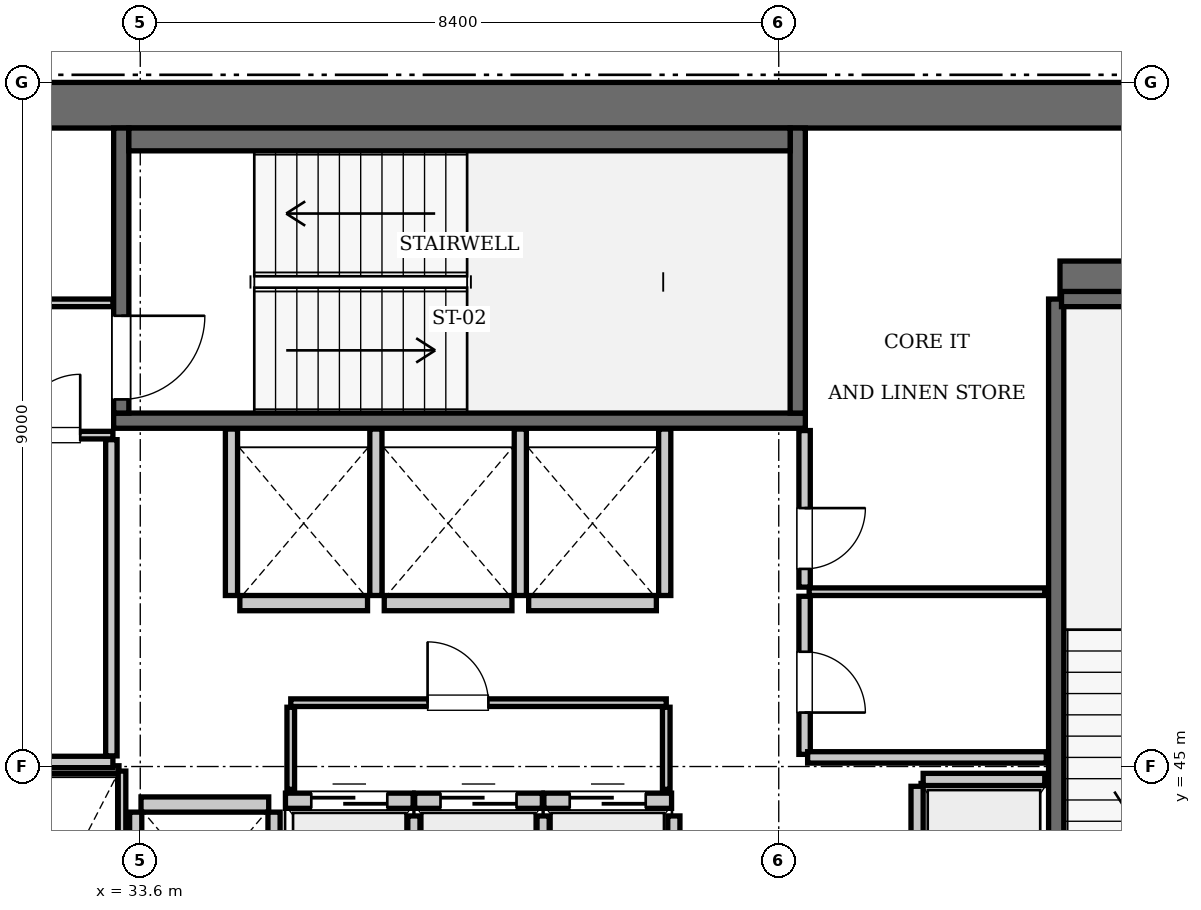
"""IFC4 building model, lengths in metres.
Left out: names, types, materials, properties, quantities, classifications, styles, units other than length and angle.
Written with IfcOpenShell. Run it as: python <this file> out.ifc"""

import sys

from ifc_helpers import new_model, si_unit, direction, frame, frame_2d, origin, place, context, subcontext, project, spatial, rectangle, extrude, element, fill, save


model = new_model("IFC4")
c1 = context("Model", 3, precision=1e-05, world=origin(), true_north=direction((0.0, 1.0)))
c2 = subcontext(c1, "Body", "Model", "MODEL_VIEW")
j1 = project(units=[si_unit("LENGTHUNIT", "METRE"), si_unit("PLANEANGLEUNIT", "RADIAN")], contexts=[c1])
p1 = place(None, origin())
s1 = spatial("IfcSite", under=j1, at=p1, CompositionType="ELEMENT")
p2 = place(p1, origin())
s2 = spatial("IfcBuilding", under=s1, at=p2, CompositionType="ELEMENT")
p3 = place(p2, frame((0.0, 0.0, 329.7)))
s3 = spatial("IfcBuildingStorey", under=s2, at=p3, CompositionType="ELEMENT", Elevation=329.7)
p4 = place(p3, frame((25.2, 53.7, 0.0), z_axis=(0.0, 0.0, 1.0), x_axis=(1.0, 0.0, 0.0)))
e1 = element("IfcWall", 1, at=p4, inside=s3, PredefinedType="SHEAR", context=c2, shape_type="SweptSolid", body=[
    extrude(rectangle(XDim=25.2, YDim=0.6, at=frame_2d((12.6, 0.0))), origin(), (0.0, 0.0, 1.0), 3.85),
])
p5 = place(p3, frame((45.7, 51.4, 0.0), z_axis=(0.0, 0.0, 1.0), x_axis=(1.0, 0.0, 0.0)))
e2 = element("IfcWall", 2, at=p5, inside=s3, PredefinedType="SHEAR", context=c2, shape_type="SweptSolid", body=[
    extrude(rectangle(XDim=4.1, YDim=0.5, at=frame_2d((2.05, 0.0))), origin(), (0.0, 0.0, 1.0), 3.85),
])
p6 = place(p3, frame((33.25, 49.55, 0.0), z_axis=(0.0, 0.0, 1.0), x_axis=(1.0, 0.0, 0.0)))
e3 = element("IfcWall", 3, at=p6, inside=s3, PredefinedType="SOLIDWALL", context=c2, shape_type="SweptSolid", body=[
    extrude(rectangle(XDim=9.1, YDim=0.2, at=frame_2d((4.55, 0.0))), origin(), (0.0, 0.0, 1.0), 3.61),
])
p7 = place(p3, frame((42.25, 49.65, 0.0), z_axis=(0.0, 0.0, 1.0), x_axis=(0.0, 1.0, 0.0)))
e4 = element("IfcWall", 4, at=p7, inside=s3, PredefinedType="SOLIDWALL", context=c2, shape_type="SweptSolid", body=[
    extrude(rectangle(XDim=3.75, YDim=0.2, at=frame_2d((1.875, 0.0))), origin(), (0.0, 0.0, 1.0), 3.61),
])
p8 = place(p3, frame((33.35, 49.65, 0.0), z_axis=(0.0, 0.0, 1.0), x_axis=(0.0, 1.0, 0.0)))
e5 = element("IfcWall", 5, at=p8, inside=s3, PredefinedType="SOLIDWALL", context=c2, shape_type="SweptSolid", body=[
    extrude(rectangle(XDim=3.75, YDim=0.2, at=frame_2d((1.875, 0.0))), origin(), (0.0, 0.0, 1.0), 3.61),
])
p9 = place(p8, frame((0.18, 0.0, 0.0)))
e6 = element("IfcOpeningElement", 6, at=p9, cuts=e5, PredefinedType="OPENING", context=c2, shape_type="SweptSolid", body=[
    extrude(rectangle(XDim=1.1, YDim=2.15, at=frame_2d((0.55, 1.075))), frame((0.0, 0.11, 0.0), z_axis=(0.0, -1.0, 0.0), x_axis=(1.0, 0.0, 0.0)), (0.0, 0.0, 1.0), 0.22),
])
p10 = place(p3, frame((33.45, 53.25, 0.0), z_axis=(0.0, 0.0, 1.0), x_axis=(1.0, 0.0, 0.0)))
e7 = element("IfcWall", 7, at=p10, inside=s3, PredefinedType="SOLIDWALL", context=c2, shape_type="SweptSolid", body=[
    extrude(rectangle(XDim=8.7, YDim=0.3, at=frame_2d((4.35, 0.0))), origin(), (0.0, 0.0, 1.0), 3.61),
])
p11 = place(p3, frame((45.65, 42.0, 0.0), z_axis=(0.0, 0.0, 1.0), x_axis=(0.0, 1.0, 0.0)))
e8 = element("IfcWall", 8, at=p11, inside=s3, PredefinedType="SOLIDWALL", context=c2, shape_type="SweptSolid", body=[
    extrude(rectangle(XDim=9.15, YDim=0.2, at=frame_2d((4.575, 0.0))), origin(), (0.0, 0.0, 1.0), 3.61),
])
p12 = place(p3, frame((45.72, 51.15, 0.0), z_axis=(0.0, 0.0, 1.0), x_axis=(1.0, 0.0, 0.0)))
e9 = element("IfcWall", 9, at=p12, inside=s3, PredefinedType="SOLIDWALL", context=c2, shape_type="SweptSolid", body=[
    extrude(rectangle(XDim=3.5, YDim=0.2, at=frame_2d((1.75, 0.0))), origin(), (0.0, 0.0, 1.0), 3.61),
])
p13 = place(p3, frame((35.51, 44.55, 0.0), z_axis=(0.0, 0.0, 1.0), x_axis=(1.0, 0.0, 0.0)))
e10 = element("IfcWall", 10, at=p13, inside=s3, PredefinedType="SOLIDWALL", context=c2, shape_type="SweptSolid", body=[
    extrude(rectangle(XDim=1.68, YDim=0.2, at=frame_2d((0.84, 0.0))), origin(), (0.0, 0.0, 1.0), 3.61),
])
p14 = place(p13, frame((0.34, 0.0, 0.0)))
e11 = element("IfcOpeningElement", 11, at=p14, cuts=e10, PredefinedType="OPENING", context=c2, shape_type="SweptSolid", body=[
    extrude(rectangle(XDim=1.0, YDim=2.15, at=frame_2d((0.5, 1.075))), frame((0.0, 0.11, 0.0), z_axis=(0.0, -1.0, 0.0), x_axis=(1.0, 0.0, 0.0)), (0.0, 0.0, 1.0), 0.22),
])
p15 = place(p3, frame((37.21, 44.55, 0.0), z_axis=(0.0, 0.0, 1.0), x_axis=(1.0, 0.0, 0.0)))
e12 = element("IfcWall", 12, at=p15, inside=s3, PredefinedType="SOLIDWALL", context=c2, shape_type="SweptSolid", body=[
    extrude(rectangle(XDim=1.68, YDim=0.2, at=frame_2d((0.84, 0.0))), origin(), (0.0, 0.0, 1.0), 3.61),
])
p16 = place(p15, frame((0.34, 0.0, 0.0)))
e13 = element("IfcOpeningElement", 13, at=p16, cuts=e12, PredefinedType="OPENING", context=c2, shape_type="SweptSolid", body=[
    extrude(rectangle(XDim=1.0, YDim=2.15, at=frame_2d((0.5, 1.075))), frame((0.0, 0.11, 0.0), z_axis=(0.0, -1.0, 0.0), x_axis=(1.0, 0.0, 0.0)), (0.0, 0.0, 1.0), 0.22),
])
p17 = place(p3, frame((38.91, 44.55, 0.0), z_axis=(0.0, 0.0, 1.0), x_axis=(1.0, 0.0, 0.0)))
e14 = element("IfcWall", 14, at=p17, inside=s3, PredefinedType="SOLIDWALL", context=c2, shape_type="SweptSolid", body=[
    extrude(rectangle(XDim=1.68, YDim=0.2, at=frame_2d((0.84, 0.0))), origin(), (0.0, 0.0, 1.0), 3.61),
])
p18 = place(p17, frame((0.34, 0.0, 0.0)))
e15 = element("IfcOpeningElement", 15, at=p18, cuts=e14, PredefinedType="OPENING", context=c2, shape_type="SweptSolid", body=[
    extrude(rectangle(XDim=1.0, YDim=2.15, at=frame_2d((0.5, 1.075))), frame((0.0, 0.11, 0.0), z_axis=(0.0, -1.0, 0.0), x_axis=(1.0, 0.0, 0.0)), (0.0, 0.0, 1.0), 0.22),
])
p19 = place(p3, frame((34.91, 47.15, 0.0), z_axis=(0.0, 0.0, 1.0), x_axis=(1.0, 0.0, 0.0)))
e16 = element("IfcWall", 16, at=p19, inside=s3, PredefinedType="SOLIDWALL", context=c2, shape_type="SweptSolid", body=[
    extrude(rectangle(XDim=1.68, YDim=0.2, at=frame_2d((0.84, 0.0))), origin(), (0.0, 0.0, 1.0), 3.61),
])
for number, where, z_axis, x_axis in (
    (17, (36.81, 47.15, 0.0), (0.0, 0.0, 1.0), (1.0, 0.0, 0.0)),
    (18, (38.71, 47.15, 0.0), (0.0, 0.0, 1.0), (1.0, 0.0, 0.0)),
    (19, (33.61, 44.5, 0.0), (0.0, 0.0, 1.0), (1.0, 0.0, 0.0)),
):
    element("IfcWall", number, at=place(p3, frame(where, z_axis=z_axis, x_axis=x_axis)), inside=s3, PredefinedType="SOLIDWALL", context=c2, shape_type="SweptSolid", body=[
        extrude(rectangle(XDim=1.68, YDim=0.2, at=frame_2d((0.84, 0.0))), origin(), (0.0, 0.0, 1.0), 3.61),
    ])
p20 = place(p3, frame((43.9, 44.83, 0.0), z_axis=(0.0, 0.0, 1.0), x_axis=(1.0, 0.0, 0.0)))
e20 = element("IfcWall", 20, at=p20, inside=s3, PredefinedType="SOLIDWALL", context=c2, shape_type="SweptSolid", body=[
    extrude(rectangle(XDim=1.6, YDim=0.16, at=frame_2d((0.8, 0.0))), origin(), (0.0, 0.0, 1.0), 3.61),
])
p21 = place(p3, frame((43.82, 42.0, 0.0), z_axis=(0.0, 0.0, 1.0), x_axis=(0.0, 1.0, 0.0)))
e21 = element("IfcWall", 21, at=p21, inside=s3, PredefinedType="SOLIDWALL", context=c2, shape_type="SweptSolid", body=[
    extrude(rectangle(XDim=2.74, YDim=0.16, at=frame_2d((1.37, 0.0))), origin(), (0.0, 0.0, 1.0), 3.61),
])
for number, where, z_axis, x_axis in (
    (22, (37.2, 42.0, 0.0), (0.0, 0.0, 1.0), (0.0, 1.0, 0.0)),
    (23, (38.9, 42.0, 0.0), (0.0, 0.0, 1.0), (0.0, 1.0, 0.0)),
    (24, (40.62, 42.0, 0.0), (0.0, 0.0, 1.0), (0.0, 1.0, 0.0)),
):
    element("IfcWall", number, at=place(p3, frame(where, z_axis=z_axis, x_axis=x_axis)), inside=s3, PredefinedType="SOLIDWALL", context=c2, shape_type="SweptSolid", body=[
        extrude(rectangle(XDim=2.35, YDim=0.16, at=frame_2d((1.175, 0.0))), origin(), (0.0, 0.0, 1.0), 3.61),
    ])
for number, where, z_axis, x_axis in (
    (25, (34.8, 47.25, 0.0), (0.0, 0.0, 1.0), (0.0, 1.0, 0.0)),
    (26, (36.7, 47.25, 0.0), (0.0, 0.0, 1.0), (0.0, 1.0, 0.0)),
    (27, (38.6, 47.25, 0.0), (0.0, 0.0, 1.0), (0.0, 1.0, 0.0)),
    (28, (40.5, 47.25, 0.0), (0.0, 0.0, 1.0), (0.0, 1.0, 0.0)),
):
    element("IfcWall", number, at=place(p3, frame(where, z_axis=z_axis, x_axis=x_axis)), inside=s3, PredefinedType="SOLIDWALL", context=c2, shape_type="SweptSolid", body=[
        extrude(rectangle(XDim=2.19, YDim=0.16, at=frame_2d((1.095, 0.0))), origin(), (0.0, 0.0, 1.0), 3.61),
    ])
for number, where, z_axis, x_axis in (
    (29, (33.54, 42.0, 0.0), (0.0, 0.0, 1.0), (0.0, 1.0, 0.0)),
    (30, (35.36, 42.0, 0.0), (0.0, 0.0, 1.0), (0.0, 1.0, 0.0)),
):
    element("IfcWall", number, at=place(p3, frame(where, z_axis=z_axis, x_axis=x_axis)), inside=s3, PredefinedType="SOLIDWALL", context=c2, shape_type="SweptSolid", body=[
        extrude(rectangle(XDim=2.4, YDim=0.16, at=frame_2d((1.2, 0.0))), origin(), (0.0, 0.0, 1.0), 3.61),
    ])
p22 = place(p3, frame((31.84, 44.96, 0.0), z_axis=(0.0, 0.0, 1.0), x_axis=(1.0, 0.0, 0.0)))
e31 = element("IfcWall", 31, at=p22, inside=s3, PredefinedType="PARTITIONING", context=c2, shape_type="SweptSolid", body=[
    extrude(rectangle(XDim=1.48, YDim=0.1, at=frame_2d((0.74, 0.0))), origin(), (0.0, 0.0, 1.0), 3.61),
])
p23 = place(p3, frame((33.36, 42.06, 0.0), z_axis=(0.0, 0.0, 1.0), x_axis=(0.0, 1.0, 0.0)))
e32 = element("IfcWall", 32, at=p23, inside=s3, PredefinedType="PARTITIONING", context=c2, shape_type="SweptSolid", body=[
    extrude(rectangle(XDim=2.88, YDim=0.1, at=frame_2d((1.44, 0.0))), origin(), (0.0, 0.0, 1.0), 3.61),
])
p24 = place(p3, frame((35.58, 45.84, 0.0), z_axis=(0.0, 0.0, 1.0), x_axis=(1.0, 0.0, 0.0)))
e33 = element("IfcWall", 33, at=p24, inside=s3, PredefinedType="PARTITIONING", context=c2, shape_type="SweptSolid", body=[
    extrude(rectangle(XDim=4.94, YDim=0.1, at=frame_2d((2.47, 0.0))), origin(), (0.0, 0.0, 1.0), 3.61),
])
p25 = place(p24, frame((1.8, 0.0, 0.0)))
e34 = element("IfcOpeningElement", 34, at=p25, cuts=e33, PredefinedType="OPENING", context=c2, shape_type="SweptSolid", body=[
    extrude(rectangle(XDim=0.8, YDim=2.05, at=frame_2d((0.4, 1.025))), frame((0.0, 0.06, 0.0), z_axis=(0.0, -1.0, 0.0), x_axis=(1.0, 0.0, 0.0)), (0.0, 0.0, 1.0), 0.12),
])
for number, where, z_axis, x_axis in (
    (35, (35.58, 44.7, 0.0), (0.0, 0.0, 1.0), (0.0, 1.0, 0.0)),
    (36, (40.52, 44.7, 0.0), (0.0, 0.0, 1.0), (0.0, 1.0, 0.0)),
):
    element("IfcWall", number, at=place(p3, frame(where, z_axis=z_axis, x_axis=x_axis)), inside=s3, PredefinedType="PARTITIONING", context=c2, shape_type="SweptSolid", body=[
        extrude(rectangle(XDim=1.08, YDim=0.1, at=frame_2d((0.54, 0.0))), origin(), (0.0, 0.0, 1.0), 3.61),
    ])
p26 = place(p3, frame((30.06, 45.06, 0.0), z_axis=(0.0, 0.0, 1.0), x_axis=(1.0, 0.0, 0.0)))
e37 = element("IfcWall", 37, at=p26, inside=s3, PredefinedType="PARTITIONING", context=c2, shape_type="SweptSolid", body=[
    extrude(rectangle(XDim=3.18, YDim=0.15, at=frame_2d((1.59, 0.0))), origin(), (0.0, 0.0, 1.0), 3.61),
])
p27 = place(p3, frame((33.22, 45.14, 0.0), z_axis=(0.0, 0.0, 1.0), x_axis=(0.0, 1.0, 0.0)))
e38 = element("IfcWall", 38, at=p27, inside=s3, PredefinedType="PARTITIONING", context=c2, shape_type="SweptSolid", body=[
    extrude(rectangle(XDim=4.16, YDim=0.15, at=frame_2d((2.08, 0.0))), origin(), (0.0, 0.0, 1.0), 3.61),
])
p28 = place(p3, frame((30.06, 49.36, 0.0), z_axis=(0.0, 0.0, 1.0), x_axis=(1.0, 0.0, 0.0)))
e39 = element("IfcWall", 39, at=p28, inside=s3, PredefinedType="PARTITIONING", context=c2, shape_type="SweptSolid", body=[
    extrude(rectangle(XDim=3.18, YDim=0.1, at=frame_2d((1.59, 0.0))), origin(), (0.0, 0.0, 1.0), 3.61),
])
p29 = place(p28, frame((1.95, 0.0, 0.0)))
e40 = element("IfcOpeningElement", 40, at=p29, cuts=e39, PredefinedType="OPENING", context=c2, shape_type="SweptSolid", body=[
    extrude(rectangle(XDim=0.8, YDim=2.05, at=frame_2d((0.4, 1.025))), frame((0.0, 0.06, 0.0), z_axis=(0.0, -1.0, 0.0), x_axis=(1.0, 0.0, 0.0)), (0.0, 0.0, 1.0), 0.12),
])
p30 = place(p3, frame((31.82, 51.1, 0.0), z_axis=(0.0, 0.0, 1.0), x_axis=(1.0, 0.0, 0.0)))
e41 = element("IfcWall", 41, at=p30, inside=s3, PredefinedType="PARTITIONING", context=c2, shape_type="SweptSolid", body=[
    extrude(rectangle(XDim=1.42, YDim=0.1, at=frame_2d((0.71, 0.0))), origin(), (0.0, 0.0, 1.0), 3.61),
])
p31 = place(p3, frame((42.34, 45.16, 0.0), z_axis=(0.0, 0.0, 1.0), x_axis=(0.0, 1.0, 0.0)))
e42 = element("IfcWall", 42, at=p31, inside=s3, PredefinedType="PARTITIONING", context=c2, shape_type="SweptSolid", body=[
    extrude(rectangle(XDim=2.08, YDim=0.15, at=frame_2d((1.04, 0.0))), origin(), (0.0, 0.0, 1.0), 3.61),
])
p32 = place(p31, frame((0.55, 0.0, 0.0)))
e43 = element("IfcOpeningElement", 43, at=p32, cuts=e42, PredefinedType="OPENING", context=c2, shape_type="SweptSolid", body=[
    extrude(rectangle(XDim=0.8, YDim=2.05, at=frame_2d((0.4, 1.025))), frame((0.0, 0.085, 0.0), z_axis=(0.0, -1.0, 0.0), x_axis=(1.0, 0.0, 0.0)), (0.0, 0.0, 1.0), 0.17),
])
p33 = place(p3, frame((42.34, 47.36, 0.0), z_axis=(0.0, 0.0, 1.0), x_axis=(0.0, 1.0, 0.0)))
e44 = element("IfcWall", 44, at=p33, inside=s3, PredefinedType="PARTITIONING", context=c2, shape_type="SweptSolid", body=[
    extrude(rectangle(XDim=2.06, YDim=0.15, at=frame_2d((1.03, 0.0))), origin(), (0.0, 0.0, 1.0), 3.61),
])
p34 = place(p33, frame((0.24, 0.0, 0.0)))
e45 = element("IfcOpeningElement", 45, at=p34, cuts=e44, PredefinedType="OPENING", context=c2, shape_type="SweptSolid", body=[
    extrude(rectangle(XDim=0.8, YDim=2.05, at=frame_2d((0.4, 1.025))), frame((0.0, 0.085, 0.0), z_axis=(0.0, -1.0, 0.0), x_axis=(1.0, 0.0, 0.0)), (0.0, 0.0, 1.0), 0.17),
])
p35 = place(p3, frame((42.4, 47.3, 0.0), z_axis=(0.0, 0.0, 1.0), x_axis=(1.0, 0.0, 0.0)))
e46 = element("IfcWall", 46, at=p35, inside=s3, PredefinedType="PARTITIONING", context=c2, shape_type="SweptSolid", body=[
    extrude(rectangle(XDim=3.1, YDim=0.1, at=frame_2d((1.55, 0.0))), origin(), (0.0, 0.0, 1.0), 3.61),
])
p36 = place(p3, frame((42.38, 45.12, 0.0), z_axis=(0.0, 0.0, 1.0), x_axis=(1.0, 0.0, 0.0)))
e47 = element("IfcWall", 47, at=p36, inside=s3, PredefinedType="PARTITIONING", context=c2, shape_type="SweptSolid", body=[
    extrude(rectangle(XDim=3.14, YDim=0.15, at=frame_2d((1.57, 0.0))), origin(), (0.0, 0.0, 1.0), 3.61),
])
p37 = place(p9, frame((1.1, 0.0, 0.0), z_axis=(0.0, 0.0, 1.0), x_axis=(-1.0, 0.0, 0.0)))
e48 = element("IfcDoor", 48, at=p37, inside=s3, OperationType="SINGLE_SWING_LEFT", PredefinedType="DOOR", context=c2, shape_type="SweptSolid", body=[
    extrude(rectangle(XDim=1.1, YDim=2.15, at=frame_2d((0.55, 1.075))), frame((0.0, 0.025, 0.0), z_axis=(0.0, -1.0, 0.0), x_axis=(1.0, 0.0, 0.0)), (0.0, 0.0, 1.0), 0.05),
])
fill(e6, e48)
p38 = place(p14, origin())
e49 = element("IfcDoor", 49, at=p38, inside=s3, OperationType="SLIDING_TO_LEFT", PredefinedType="DOOR", context=c2, shape_type="SweptSolid", body=[
    extrude(rectangle(XDim=1.0, YDim=2.15, at=frame_2d((0.5, 1.075))), frame((0.0, 0.025, 0.0), z_axis=(0.0, -1.0, 0.0), x_axis=(1.0, 0.0, 0.0)), (0.0, 0.0, 1.0), 0.05),
])
fill(e11, e49)
p39 = place(p16, origin())
e50 = element("IfcDoor", 50, at=p39, inside=s3, OperationType="SLIDING_TO_LEFT", PredefinedType="DOOR", context=c2, shape_type="SweptSolid", body=[
    extrude(rectangle(XDim=1.0, YDim=2.15, at=frame_2d((0.5, 1.075))), frame((0.0, 0.025, 0.0), z_axis=(0.0, -1.0, 0.0), x_axis=(1.0, 0.0, 0.0)), (0.0, 0.0, 1.0), 0.05),
])
fill(e13, e50)
p40 = place(p18, origin())
e51 = element("IfcDoor", 51, at=p40, inside=s3, OperationType="SLIDING_TO_LEFT", PredefinedType="DOOR", context=c2, shape_type="SweptSolid", body=[
    extrude(rectangle(XDim=1.0, YDim=2.15, at=frame_2d((0.5, 1.075))), frame((0.0, 0.025, 0.0), z_axis=(0.0, -1.0, 0.0), x_axis=(1.0, 0.0, 0.0)), (0.0, 0.0, 1.0), 0.05),
])
fill(e15, e51)
p41 = place(p25, origin())
e52 = element("IfcDoor", 52, at=p41, inside=s3, OperationType="SINGLE_SWING_LEFT", PredefinedType="DOOR", context=c2, shape_type="SweptSolid", body=[
    extrude(rectangle(XDim=0.8, YDim=2.05, at=frame_2d((0.4, 1.025))), frame((0.0, 0.025, 0.0), z_axis=(0.0, -1.0, 0.0), x_axis=(1.0, 0.0, 0.0)), (0.0, 0.0, 1.0), 0.05),
])
fill(e34, e52)
p42 = place(p29, origin())
e53 = element("IfcDoor", 53, at=p42, inside=s3, OperationType="SINGLE_SWING_RIGHT", PredefinedType="DOOR", context=c2, shape_type="SweptSolid", body=[
    extrude(rectangle(XDim=0.8, YDim=2.05, at=frame_2d((0.4, 1.025))), frame((0.0, 0.025, 0.0), z_axis=(0.0, -1.0, 0.0), x_axis=(1.0, 0.0, 0.0)), (0.0, 0.0, 1.0), 0.05),
])
fill(e40, e53)
p43 = place(p32, frame((0.8, 0.0, 0.0), z_axis=(0.0, 0.0, 1.0), x_axis=(-1.0, 0.0, 0.0)))
e54 = element("IfcDoor", 54, at=p43, inside=s3, OperationType="SINGLE_SWING_RIGHT", PredefinedType="DOOR", context=c2, shape_type="SweptSolid", body=[
    extrude(rectangle(XDim=0.8, YDim=2.05, at=frame_2d((0.4, 1.025))), frame((0.0, 0.025, 0.0), z_axis=(0.0, -1.0, 0.0), x_axis=(1.0, 0.0, 0.0)), (0.0, 0.0, 1.0), 0.05),
])
fill(e43, e54)
p44 = place(p34, frame((0.8, 0.0, 0.0), z_axis=(0.0, 0.0, 1.0), x_axis=(-1.0, 0.0, 0.0)))
e55 = element("IfcDoor", 55, at=p44, inside=s3, OperationType="SINGLE_SWING_LEFT", PredefinedType="DOOR", context=c2, shape_type="SweptSolid", body=[
    extrude(rectangle(XDim=0.8, YDim=2.05, at=frame_2d((0.4, 1.025))), frame((0.0, 0.025, 0.0), z_axis=(0.0, -1.0, 0.0), x_axis=(1.0, 0.0, 0.0)), (0.0, 0.0, 1.0), 0.05),
])
fill(e45, e55)
save(model, sys.argv[1])
